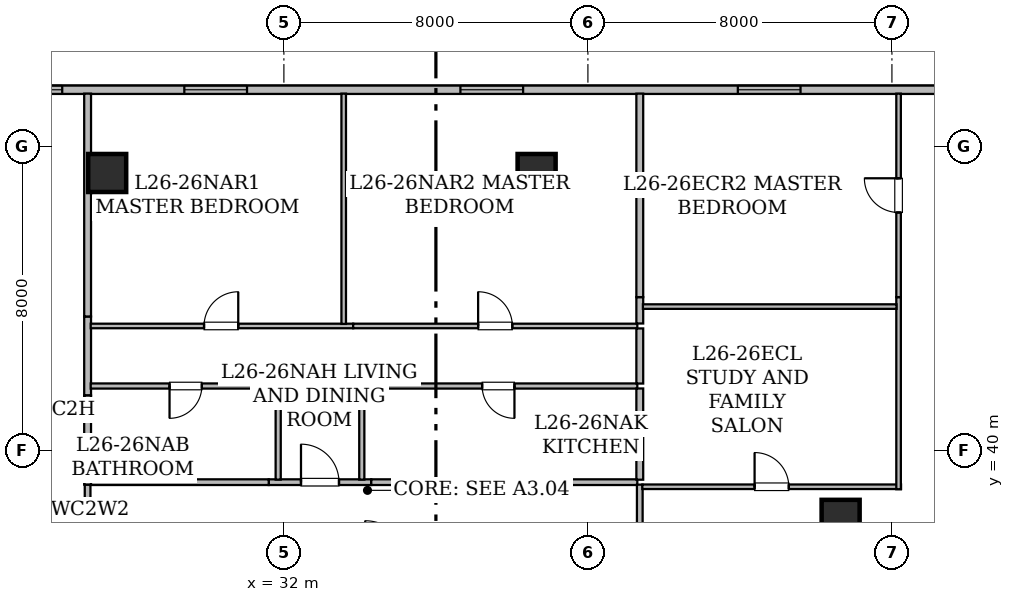
"""IFC4 building model, lengths in metres.
Left out: names, types, materials, properties, quantities, classifications, styles, units other than length and angle.
Written with IfcOpenShell. Run it as: python <this file> out.ifc"""

import sys

from ifc_helpers import new_model, si_unit, direction, frame, frame_2d, origin, origin_2d, place, context, subcontext, project, spatial, rectangle, hollow_rectangle, extrude, element, fill, save


model = new_model("IFC4")
c1 = context("Model", 3, precision=1e-05, world=origin(), true_north=direction((0.0, 1.0)))
c2 = subcontext(c1, "Body", "Model", "MODEL_VIEW")
j1 = project(units=[si_unit("LENGTHUNIT", "METRE"), si_unit("PLANEANGLEUNIT", "RADIAN")], contexts=[c1])
p1 = place(None, origin())
s1 = spatial("IfcSite", under=j1, at=p1, CompositionType="ELEMENT")
p2 = place(p1, origin())
s2 = spatial("IfcBuilding", under=s1, at=p2, CompositionType="ELEMENT")
p3 = place(p2, frame((0.0, 0.0, 105.55)))
s3 = spatial("IfcBuildingStorey", under=s2, at=p3, CompositionType="ELEMENT", Elevation=105.55)
for number, where, z_axis, x_axis in (
    (1, (27.35, 47.3, 0.0), (0.0, 0.0, 1.0), (1.0, 0.0, 0.0)),
    (2, (38.65, 47.3, 0.0), (0.0, 0.0, 1.0), (1.0, 0.0, 0.0)),
    (3, (46.65, 38.2, 0.0), (0.0, 0.0, 1.0), (1.0, 0.0, 0.0)),
):
    element("IfcColumn", number, at=place(p3, frame(where, z_axis=z_axis, x_axis=x_axis)), inside=s3, PredefinedType="COLUMN", context=c2, shape_type="SweptSolid", body=[
        extrude(hollow_rectangle(XDim=1.0, YDim=1.0, WallThickness=0.05, at=origin_2d()), origin(), (0.0, 0.0, 1.0), 3.65),
    ])
p4 = place(p3, frame((13.715, 49.49, 0.0), z_axis=(0.0, 0.0, 1.0), x_axis=(1.0, 0.0, 0.0)))
e4 = element("IfcWall", 4, at=p4, inside=s3, PredefinedType="STANDARD", context=c2, shape_type="SweptSolid", body=[
    extrude(rectangle(XDim=38.639, YDim=0.22, at=frame_2d((19.319, 0.0))), origin(), (0.0, 0.0, 1.0), 3.43),
])
p5 = place(p4, frame((1.435, 0.0, 0.85)))
e5 = element("IfcOpeningElement", 5, at=p5, cuts=e4, PredefinedType="OPENING", context=c2, shape_type="SweptSolid", body=[
    extrude(rectangle(XDim=1.65, YDim=1.55, at=frame_2d((0.825, 0.775))), frame((0.0, 0.12, 0.0), z_axis=(0.0, -1.0, 0.0), x_axis=(1.0, 0.0, 0.0)), (0.0, 0.0, 1.0), 0.24),
])
p6 = place(p4, frame((10.802, 0.0, 0.85)))
e6 = element("IfcOpeningElement", 6, at=p6, cuts=e4, PredefinedType="OPENING", context=c2, shape_type="SweptSolid", body=[
    extrude(rectangle(XDim=1.65, YDim=1.55, at=frame_2d((0.825, 0.775))), frame((0.0, 0.12, 0.0), z_axis=(0.0, -1.0, 0.0), x_axis=(1.0, 0.0, 0.0)), (0.0, 0.0, 1.0), 0.24),
])
p7 = place(p4, frame((8.744, 0.0, 0.8)))
e7 = element("IfcOpeningElement", 7, at=p7, cuts=e4, PredefinedType="OPENING", context=c2, shape_type="SweptSolid", body=[
    extrude(rectangle(XDim=1.2, YDim=1.5, at=frame_2d((0.6, 0.75))), frame((0.0, 0.12, 0.0), z_axis=(0.0, -1.0, 0.0), x_axis=(1.0, 0.0, 0.0)), (0.0, 0.0, 1.0), 0.24),
])
p8 = place(p4, frame((5.319, 0.0, 0.85)))
e8 = element("IfcOpeningElement", 8, at=p8, cuts=e4, PredefinedType="OPENING", context=c2, shape_type="SweptSolid", body=[
    extrude(rectangle(XDim=1.65, YDim=1.55, at=frame_2d((0.825, 0.775))), frame((0.0, 0.12, 0.0), z_axis=(0.0, -1.0, 0.0), x_axis=(1.0, 0.0, 0.0)), (0.0, 0.0, 1.0), 0.24),
])
p9 = place(p4, frame((15.665, 0.0, 0.85)))
e9 = element("IfcOpeningElement", 9, at=p9, cuts=e4, PredefinedType="OPENING", context=c2, shape_type="SweptSolid", body=[
    extrude(rectangle(XDim=1.65, YDim=1.55, at=frame_2d((0.825, 0.775))), frame((0.0, 0.12, 0.0), z_axis=(0.0, -1.0, 0.0), x_axis=(1.0, 0.0, 0.0)), (0.0, 0.0, 1.0), 0.24),
])
p10 = place(p4, frame((22.93, 0.0, 0.85)))
e10 = element("IfcOpeningElement", 10, at=p10, cuts=e4, PredefinedType="OPENING", context=c2, shape_type="SweptSolid", body=[
    extrude(rectangle(XDim=1.65, YDim=1.55, at=frame_2d((0.825, 0.775))), frame((0.0, 0.12, 0.0), z_axis=(0.0, -1.0, 0.0), x_axis=(1.0, 0.0, 0.0)), (0.0, 0.0, 1.0), 0.24),
])
p11 = place(p4, frame((30.23, 0.0, 0.85)))
e11 = element("IfcOpeningElement", 11, at=p11, cuts=e4, PredefinedType="OPENING", context=c2, shape_type="SweptSolid", body=[
    extrude(rectangle(XDim=1.65, YDim=1.55, at=frame_2d((0.825, 0.775))), frame((0.0, 0.12, 0.0), z_axis=(0.0, -1.0, 0.0), x_axis=(1.0, 0.0, 0.0)), (0.0, 0.0, 1.0), 0.24),
])
p12 = place(p4, frame((36.367, 0.0, 0.85)))
e12 = element("IfcOpeningElement", 12, at=p12, cuts=e4, PredefinedType="OPENING", context=c2, shape_type="SweptSolid", body=[
    extrude(rectangle(XDim=1.65, YDim=1.55, at=frame_2d((0.825, 0.775))), frame((0.0, 0.12, 0.0), z_axis=(0.0, -1.0, 0.0), x_axis=(1.0, 0.0, 0.0)), (0.0, 0.0, 1.0), 0.24),
])
p13 = place(p3, frame((26.835, 35.732, 0.0), z_axis=(0.0, 0.0, 1.0), x_axis=(0.0, 1.0, 0.0)))
e13 = element("IfcWall", 13, at=p13, inside=s3, PredefinedType="STANDARD", context=c2, shape_type="SweptSolid", body=[
    extrude(rectangle(XDim=3.368, YDim=0.15, at=frame_2d((1.684, 0.0))), origin(), (0.0, 0.0, 1.0), 2.647),
])
p14 = place(p3, frame((31.601, 39.165, 0.0), z_axis=(0.0, 0.0, 1.0), x_axis=(1.0, 0.0, 0.0)))
e14 = element("IfcWall", 14, at=p14, inside=s3, PredefinedType="STANDARD", context=c2, shape_type="SweptSolid", body=[
    extrude(rectangle(XDim=2.698, YDim=0.15, at=frame_2d((1.349, 0.0))), origin(), (0.0, 0.0, 1.0), 3.43),
])
p15 = place(p14, frame((0.849, 0.0, 0.0)))
e15 = element("IfcOpeningElement", 15, at=p15, cuts=e14, PredefinedType="OPENING", context=c2, shape_type="SweptSolid", body=[
    extrude(rectangle(XDim=1.0, YDim=2.15, at=frame_2d((0.5, 1.075))), frame((0.0, 0.085, 0.0), z_axis=(0.0, -1.0, 0.0), x_axis=(1.0, 0.0, 0.0)), (0.0, 0.0, 1.0), 0.17),
])
p16 = place(p3, frame((26.9, 39.165, 0.0), z_axis=(0.0, 0.0, 1.0), x_axis=(1.0, 0.0, 0.0)))
e16 = element("IfcWall", 16, at=p16, inside=s3, PredefinedType="STANDARD", context=c2, shape_type="SweptSolid", body=[
    extrude(rectangle(XDim=4.701, YDim=0.15, at=frame_2d((2.351, 0.0))), origin(), (0.0, 0.0, 1.0), 2.647),
])
p17 = place(p3, frame((34.299, 39.165, 0.0), z_axis=(0.0, 0.0, 1.0), x_axis=(1.0, 0.0, 0.0)))
e17 = element("IfcWall", 17, at=p17, inside=s3, PredefinedType="STANDARD", context=c2, shape_type="SweptSolid", body=[
    extrude(rectangle(XDim=7.001, YDim=0.15, at=frame_2d((3.5, 0.0))), origin(), (0.0, 0.0, 1.0), 2.647),
])
p18 = place(p3, frame((41.365, 39.1, 0.0), z_axis=(0.0, 0.0, 1.0), x_axis=(0.0, -1.0, 0.0)))
e18 = element("IfcWall", 18, at=p18, inside=s3, PredefinedType="STANDARD", context=c2, shape_type="SweptSolid", body=[
    extrude(rectangle(XDim=1.885, YDim=0.15, at=frame_2d((0.942, 0.0))), origin(), (0.0, 0.0, 1.0), 2.647),
])
p19 = place(p3, frame((26.835, 43.524, 0.0), z_axis=(0.0, 0.0, 1.0), x_axis=(0.0, -1.0, 0.0)))
e19 = element("IfcWall", 19, at=p19, inside=s3, PredefinedType="STANDARD", context=c2, shape_type="SweptSolid", body=[
    extrude(rectangle(XDim=2.078, YDim=0.18, at=frame_2d((1.039, 0.0))), origin(), (0.0, 0.0, 1.0), 3.43),
])
p20 = place(p3, frame((26.835, 41.446, 0.0), z_axis=(0.0, 0.0, 1.0), x_axis=(0.0, -1.0, 0.0)))
e20 = element("IfcWall", 20, at=p20, inside=s3, PredefinedType="STANDARD", context=c2, shape_type="SweptSolid", body=[
    extrude(rectangle(XDim=2.346, YDim=0.18, at=frame_2d((1.173, 0.0))), origin(), (0.0, 0.0, 1.0), 3.43),
])
p21 = place(p3, frame((26.835, 49.388, 0.0), z_axis=(0.0, 0.0, 1.0), x_axis=(0.0, -1.0, 0.0)))
e21 = element("IfcWall", 21, at=p21, inside=s3, PredefinedType="STANDARD", context=c2, shape_type="SweptSolid", body=[
    extrude(rectangle(XDim=5.864, YDim=0.18, at=frame_2d((2.932, 0.0))), origin(), (0.0, 0.0, 1.0), 2.876),
])
p22 = place(p3, frame((31.85, 39.232, 0.0), z_axis=(0.0, 0.0, 1.0), x_axis=(0.0, 1.0, 0.0)))
e22 = element("IfcWall", 22, at=p22, inside=s3, PredefinedType="PARTITIONING", context=c2, shape_type="SweptSolid", body=[
    extrude(rectangle(XDim=2.528, YDim=0.135, at=frame_2d((1.264, 0.0))), origin(), (0.0, 0.0, 1.0), 3.43),
])
p23 = place(p3, frame((31.915, 41.695, 0.0), z_axis=(0.0, 0.0, 1.0), x_axis=(-1.0, 0.0, 0.0)))
e23 = element("IfcWall", 23, at=p23, inside=s3, PredefinedType="PARTITIONING", context=c2, shape_type="SweptSolid", body=[
    extrude(rectangle(XDim=4.998, YDim=0.135, at=frame_2d((2.499, 0.0))), origin(), (0.0, 0.0, 1.0), 2.647),
])
p24 = place(p23, frame((2.074, 0.0, 0.0)))
e24 = element("IfcOpeningElement", 24, at=p24, cuts=e23, PredefinedType="OPENING", context=c2, shape_type="SweptSolid", body=[
    extrude(rectangle(XDim=0.85, YDim=2.1, at=frame_2d((0.425, 1.05))), frame((0.0, 0.077, 0.0), z_axis=(0.0, -1.0, 0.0), x_axis=(1.0, 0.0, 0.0)), (0.0, 0.0, 1.0), 0.155),
])
p25 = place(p3, frame((41.3, 41.695, 0.0), z_axis=(0.0, 0.0, 1.0), x_axis=(-1.0, 0.0, 0.0)))
e25 = element("IfcWall", 25, at=p25, inside=s3, PredefinedType="PARTITIONING", context=c2, shape_type="SweptSolid", body=[
    extrude(rectangle(XDim=7.315, YDim=0.135, at=frame_2d((3.657, 0.0))), origin(), (0.0, 0.0, 1.0), 2.647),
])
p26 = place(p25, frame((3.233, 0.0, 0.0)))
e26 = element("IfcOpeningElement", 26, at=p26, cuts=e25, PredefinedType="OPENING", context=c2, shape_type="SweptSolid", body=[
    extrude(rectangle(XDim=0.85, YDim=2.1, at=frame_2d((0.425, 1.05))), frame((0.0, 0.077, 0.0), z_axis=(0.0, -1.0, 0.0), x_axis=(1.0, 0.0, 0.0)), (0.0, 0.0, 1.0), 0.155),
])
p27 = place(p3, frame((34.05, 41.76, 0.0), z_axis=(0.0, 0.0, 1.0), x_axis=(0.0, -1.0, 0.0)))
e27 = element("IfcWall", 27, at=p27, inside=s3, PredefinedType="PARTITIONING", context=c2, shape_type="SweptSolid", body=[
    extrude(rectangle(XDim=2.528, YDim=0.135, at=frame_2d((1.264, 0.0))), origin(), (0.0, 0.0, 1.0), 3.43),
])
p28 = place(p3, frame((26.917, 43.275, 0.0), z_axis=(0.0, 0.0, 1.0), x_axis=(1.0, 0.0, 0.0)))
e28 = element("IfcWall", 28, at=p28, inside=s3, PredefinedType="PARTITIONING", context=c2, shape_type="SweptSolid", body=[
    extrude(rectangle(XDim=6.906, YDim=0.12, at=frame_2d((3.453, 0.0))), origin(), (0.0, 0.0, 1.0), 2.647),
])
p29 = place(p28, frame((2.982, 0.0, 0.0)))
e29 = element("IfcOpeningElement", 29, at=p29, cuts=e28, PredefinedType="OPENING", context=c2, shape_type="SweptSolid", body=[
    extrude(rectangle(XDim=0.9, YDim=2.1, at=frame_2d((0.45, 1.05))), frame((0.0, 0.07, 0.0), z_axis=(0.0, -1.0, 0.0), x_axis=(1.0, 0.0, 0.0)), (0.0, 0.0, 1.0), 0.14),
])
p30 = place(p3, frame((33.823, 43.275, 0.0), z_axis=(0.0, 0.0, 1.0), x_axis=(1.0, 0.0, 0.0)))
e30 = element("IfcWall", 30, at=p30, inside=s3, PredefinedType="PARTITIONING", context=c2, shape_type="SweptSolid", body=[
    extrude(rectangle(XDim=7.477, YDim=0.12, at=frame_2d((3.739, 0.0))), origin(), (0.0, 0.0, 1.0), 2.647),
])
p31 = place(p30, frame((3.288, 0.0, 0.0)))
e31 = element("IfcOpeningElement", 31, at=p31, cuts=e30, PredefinedType="OPENING", context=c2, shape_type="SweptSolid", body=[
    extrude(rectangle(XDim=0.9, YDim=2.1, at=frame_2d((0.45, 1.05))), frame((0.0, 0.07, 0.0), z_axis=(0.0, -1.0, 0.0), x_axis=(1.0, 0.0, 0.0)), (0.0, 0.0, 1.0), 0.14),
])
p32 = place(p3, frame((41.365, 43.21, 0.0), z_axis=(0.0, 0.0, 1.0), x_axis=(0.0, -1.0, 0.0)))
e32 = element("IfcWall", 32, at=p32, inside=s3, PredefinedType="STANDARD", context=c2, shape_type="SweptSolid", body=[
    extrude(rectangle(XDim=1.45, YDim=0.18, at=frame_2d((0.725, 0.0))), origin(), (0.0, 0.0, 1.0), 3.43),
])
p33 = place(p3, frame((41.365, 41.63, 0.0), z_axis=(0.0, 0.0, 1.0), x_axis=(0.0, -1.0, 0.0)))
e33 = element("IfcWall", 33, at=p33, inside=s3, PredefinedType="STANDARD", context=c2, shape_type="SweptSolid", body=[
    extrude(rectangle(XDim=2.4, YDim=0.18, at=frame_2d((1.2, 0.0))), origin(), (0.0, 0.0, 1.0), 3.43),
])
p34 = place(p3, frame((33.574, 49.388, 0.0), z_axis=(0.0, 0.0, 1.0), x_axis=(0.0, -1.0, 0.0)))
e34 = element("IfcWall", 34, at=p34, inside=s3, PredefinedType="PARTITIONING", context=c2, shape_type="SweptSolid", body=[
    extrude(rectangle(XDim=6.059, YDim=0.12, at=frame_2d((3.029, 0.0))), origin(), (0.0, 0.0, 1.0), 2.876),
])
p35 = place(p3, frame((41.365, 44.034, 0.0), z_axis=(0.0, 0.0, 1.0), x_axis=(0.0, -1.0, 0.0)))
e35 = element("IfcWall", 35, at=p35, inside=s3, PredefinedType="STANDARD", context=c2, shape_type="SweptSolid", body=[
    extrude(rectangle(XDim=0.694, YDim=0.18, at=frame_2d((0.347, 0.0))), origin(), (0.0, 0.0, 1.0), 3.43),
])
p36 = place(p3, frame((41.365, 49.388, 0.0), z_axis=(0.0, 0.0, 1.0), x_axis=(0.0, -1.0, 0.0)))
e36 = element("IfcWall", 36, at=p36, inside=s3, PredefinedType="STANDARD", context=c2, shape_type="SweptSolid", body=[
    extrude(rectangle(XDim=5.354, YDim=0.18, at=frame_2d((2.677, 0.0))), origin(), (0.0, 0.0, 1.0), 2.876),
])
p37 = place(p3, frame((41.432, 39.044, 0.0), z_axis=(0.0, 0.0, 1.0), x_axis=(1.0, 0.0, 0.0)))
e37 = element("IfcWall", 37, at=p37, inside=s3, PredefinedType="PARTITIONING", context=c2, shape_type="SweptSolid", body=[
    extrude(rectangle(XDim=6.808, YDim=0.12, at=frame_2d((3.404, 0.0))), origin(), (0.0, 0.0, 1.0), 2.647),
])
p38 = place(p37, frame((2.954, 0.0, 0.0)))
e38 = element("IfcOpeningElement", 38, at=p38, cuts=e37, PredefinedType="OPENING", context=c2, shape_type="SweptSolid", body=[
    extrude(rectangle(XDim=0.9, YDim=2.1, at=frame_2d((0.45, 1.05))), frame((0.0, 0.07, 0.0), z_axis=(0.0, -1.0, 0.0), x_axis=(1.0, 0.0, 0.0)), (0.0, 0.0, 1.0), 0.14),
])
p39 = place(p3, frame((48.175, 38.979, 0.0), z_axis=(0.0, 0.0, 1.0), x_axis=(0.0, 1.0, 0.0)))
e39 = element("IfcWall", 39, at=p39, inside=s3, PredefinedType="PARTITIONING", context=c2, shape_type="SweptSolid", body=[
    extrude(rectangle(XDim=5.055, YDim=0.12, at=frame_2d((2.527, 0.0))), origin(), (0.0, 0.0, 1.0), 2.647),
])
p40 = place(p3, frame((48.175, 44.034, 0.0), z_axis=(0.0, 0.0, 1.0), x_axis=(0.0, 1.0, 0.0)))
e40 = element("IfcWall", 40, at=p40, inside=s3, PredefinedType="PARTITIONING", context=c2, shape_type="SweptSolid", body=[
    extrude(rectangle(XDim=5.354, YDim=0.12, at=frame_2d((2.677, 0.0))), origin(), (0.0, 0.0, 1.0), 2.876),
])
p41 = place(p40, frame((2.227, 0.0, 0.0)))
e41 = element("IfcOpeningElement", 41, at=p41, cuts=e40, PredefinedType="OPENING", context=c2, shape_type="SweptSolid", body=[
    extrude(rectangle(XDim=0.9, YDim=2.1, at=frame_2d((0.45, 1.05))), frame((0.0, 0.07, 0.0), z_axis=(0.0, -1.0, 0.0), x_axis=(1.0, 0.0, 0.0)), (0.0, 0.0, 1.0), 0.14),
])
p42 = place(p3, frame((41.447, 43.785, 0.0), z_axis=(0.0, 0.0, 1.0), x_axis=(1.0, 0.0, 0.0)))
e42 = element("IfcWall", 42, at=p42, inside=s3, PredefinedType="PARTITIONING", context=c2, shape_type="SweptSolid", body=[
    extrude(rectangle(XDim=6.674, YDim=0.12, at=frame_2d((3.337, 0.0))), origin(), (0.0, 0.0, 1.0), 3.43),
])
p43 = place(p6, origin())
e43 = element("IfcWindow", 43, at=p43, inside=s3, PartitioningType="SINGLE_PANEL", PredefinedType="WINDOW", context=c2, shape_type="SweptSolid", body=[
    extrude(rectangle(XDim=1.65, YDim=1.55, at=frame_2d((0.825, 0.775))), frame((0.0, 0.03, 0.0), z_axis=(0.0, -1.0, 0.0), x_axis=(1.0, 0.0, 0.0)), (0.0, 0.0, 1.0), 0.06),
])
fill(e6, e43)
p44 = place(p9, origin())
e44 = element("IfcWindow", 44, at=p44, inside=s3, PartitioningType="SINGLE_PANEL", PredefinedType="WINDOW", context=c2, shape_type="SweptSolid", body=[
    extrude(rectangle(XDim=1.65, YDim=1.55, at=frame_2d((0.825, 0.775))), frame((0.0, 0.03, 0.0), z_axis=(0.0, -1.0, 0.0), x_axis=(1.0, 0.0, 0.0)), (0.0, 0.0, 1.0), 0.06),
])
fill(e9, e44)
p45 = place(p10, origin())
e45 = element("IfcWindow", 45, at=p45, inside=s3, PartitioningType="SINGLE_PANEL", PredefinedType="WINDOW", context=c2, shape_type="SweptSolid", body=[
    extrude(rectangle(XDim=1.65, YDim=1.55, at=frame_2d((0.825, 0.775))), frame((0.0, 0.03, 0.0), z_axis=(0.0, -1.0, 0.0), x_axis=(1.0, 0.0, 0.0)), (0.0, 0.0, 1.0), 0.06),
])
fill(e10, e45)
p46 = place(p11, origin())
e46 = element("IfcWindow", 46, at=p46, inside=s3, PartitioningType="SINGLE_PANEL", PredefinedType="WINDOW", context=c2, shape_type="SweptSolid", body=[
    extrude(rectangle(XDim=1.65, YDim=1.55, at=frame_2d((0.825, 0.775))), frame((0.0, 0.03, 0.0), z_axis=(0.0, -1.0, 0.0), x_axis=(1.0, 0.0, 0.0)), (0.0, 0.0, 1.0), 0.06),
])
fill(e11, e46)
p47 = place(p15, origin())
e47 = element("IfcDoor", 47, at=p47, inside=s3, OperationType="SINGLE_SWING_LEFT", PredefinedType="DOOR", context=c2, shape_type="SweptSolid", body=[
    extrude(rectangle(XDim=1.0, YDim=2.15, at=frame_2d((0.5, 1.075))), frame((0.0, 0.025, 0.0), z_axis=(0.0, -1.0, 0.0), x_axis=(1.0, 0.0, 0.0)), (0.0, 0.0, 1.0), 0.05),
])
fill(e15, e47)
p48 = place(p24, origin())
e48 = element("IfcDoor", 48, at=p48, inside=s3, OperationType="SINGLE_SWING_RIGHT", PredefinedType="DOOR", context=c2, shape_type="SweptSolid", body=[
    extrude(rectangle(XDim=0.85, YDim=2.1, at=frame_2d((0.425, 1.05))), frame((0.0, 0.025, 0.0), z_axis=(0.0, -1.0, 0.0), x_axis=(1.0, 0.0, 0.0)), (0.0, 0.0, 1.0), 0.05),
])
fill(e24, e48)
p49 = place(p26, origin())
e49 = element("IfcDoor", 49, at=p49, inside=s3, OperationType="SINGLE_SWING_LEFT", PredefinedType="DOOR", context=c2, shape_type="SweptSolid", body=[
    extrude(rectangle(XDim=0.85, YDim=2.1, at=frame_2d((0.425, 1.05))), frame((0.0, 0.025, 0.0), z_axis=(0.0, -1.0, 0.0), x_axis=(1.0, 0.0, 0.0)), (0.0, 0.0, 1.0), 0.05),
])
fill(e26, e49)
p50 = place(p29, origin())
e50 = element("IfcDoor", 50, at=p50, inside=s3, OperationType="SINGLE_SWING_RIGHT", PredefinedType="DOOR", context=c2, shape_type="SweptSolid", body=[
    extrude(rectangle(XDim=0.9, YDim=2.1, at=frame_2d((0.45, 1.05))), frame((0.0, 0.025, 0.0), z_axis=(0.0, -1.0, 0.0), x_axis=(1.0, 0.0, 0.0)), (0.0, 0.0, 1.0), 0.05),
])
fill(e29, e50)
p51 = place(p31, origin())
e51 = element("IfcDoor", 51, at=p51, inside=s3, OperationType="SINGLE_SWING_LEFT", PredefinedType="DOOR", context=c2, shape_type="SweptSolid", body=[
    extrude(rectangle(XDim=0.9, YDim=2.1, at=frame_2d((0.45, 1.05))), frame((0.0, 0.025, 0.0), z_axis=(0.0, -1.0, 0.0), x_axis=(1.0, 0.0, 0.0)), (0.0, 0.0, 1.0), 0.05),
])
fill(e31, e51)
p52 = place(p38, origin())
e52 = element("IfcDoor", 52, at=p52, inside=s3, OperationType="SINGLE_SWING_LEFT", PredefinedType="DOOR", context=c2, shape_type="SweptSolid", body=[
    extrude(rectangle(XDim=0.9, YDim=2.1, at=frame_2d((0.45, 1.05))), frame((0.0, 0.025, 0.0), z_axis=(0.0, -1.0, 0.0), x_axis=(1.0, 0.0, 0.0)), (0.0, 0.0, 1.0), 0.05),
])
fill(e38, e52)
p53 = place(p41, origin())
e53 = element("IfcDoor", 53, at=p53, inside=s3, OperationType="SINGLE_SWING_RIGHT", PredefinedType="DOOR", context=c2, shape_type="SweptSolid", body=[
    extrude(rectangle(XDim=0.9, YDim=2.1, at=frame_2d((0.45, 1.05))), frame((0.0, 0.025, 0.0), z_axis=(0.0, -1.0, 0.0), x_axis=(1.0, 0.0, 0.0)), (0.0, 0.0, 1.0), 0.05),
])
fill(e41, e53)
save(model, sys.argv[1])
